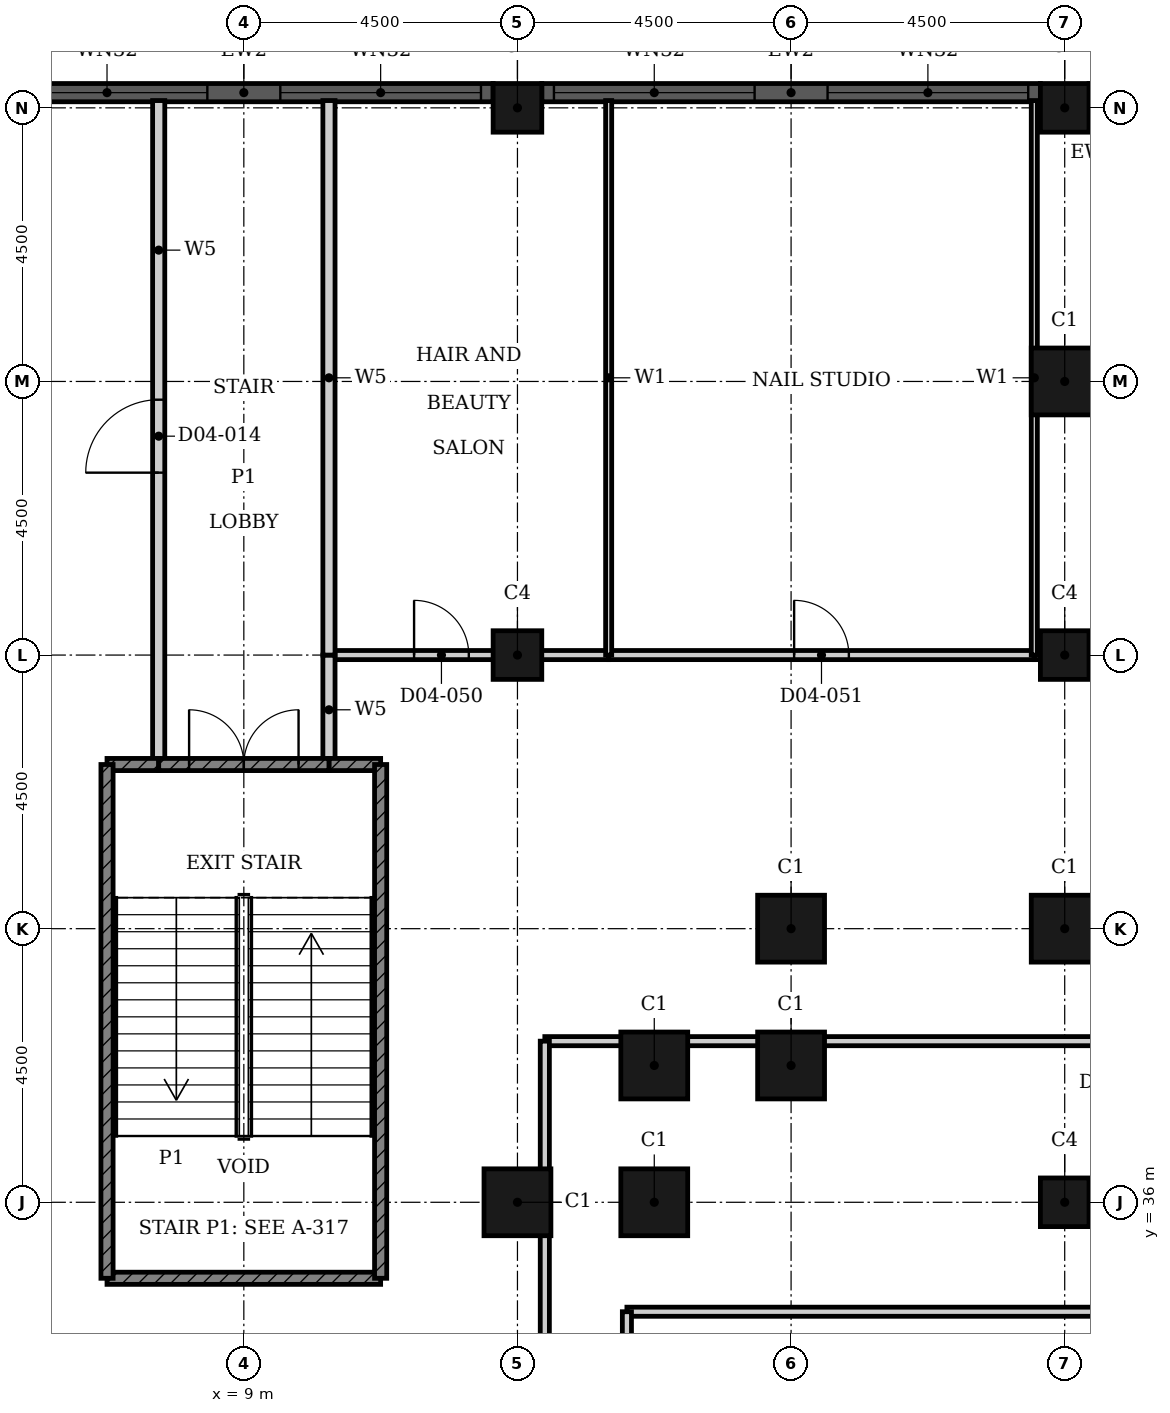
"""IFC4 building model, lengths in metres.
Left out: names, types, materials, properties, quantities, classifications, styles, units other than length and angle.
Written with IfcOpenShell. Run it as: python <this file> out.ifc"""

import sys

from ifc_helpers import new_model, si_unit, direction, frame, frame_2d, origin, origin_2d, place, context, subcontext, project, spatial, rectangle, hollow_rectangle, extrude, element, fill, save


model = new_model("IFC4")
c1 = context("Model", 3, precision=1e-05, world=origin(), true_north=direction((0.0, 1.0)))
c2 = subcontext(c1, "Body", "Model", "MODEL_VIEW")
j1 = project(units=[si_unit("LENGTHUNIT", "METRE"), si_unit("PLANEANGLEUNIT", "RADIAN")], contexts=[c1])
p1 = place(None, origin())
s1 = spatial("IfcSite", under=j1, at=p1, CompositionType="ELEMENT")
p2 = place(p1, origin())
s2 = spatial("IfcBuilding", under=s1, at=p2, CompositionType="ELEMENT")
p3 = place(p2, frame((0.0, 0.0, 24.0)))
s3 = spatial("IfcBuildingStorey", under=s2, at=p3, CompositionType="ELEMENT", Elevation=24.0)
for number, where, z_axis, x_axis in (
    (1, (22.5, 49.5, 0.0), (0.0, 0.0, 1.0), (1.0, 0.0, 0.0)),
    (2, (22.5, 40.5, 0.0), (0.0, 0.0, 1.0), (1.0, 0.0, 0.0)),
    (3, (18.0, 40.5, 0.0), (0.0, 0.0, 1.0), (1.0, 0.0, 0.0)),
    (4, (18.0, 38.25, 0.0), (0.0, 0.0, 1.0), (1.0, 0.0, 0.0)),
    (5, (15.75, 38.25, 0.0), (0.0, 0.0, 1.0), (1.0, 0.0, 0.0)),
    (6, (15.75, 36.0, 0.0), (0.0, 0.0, 1.0), (1.0, 0.0, 0.0)),
    (7, (13.5, 36.0, 0.0), (0.0, 0.0, 1.0), (1.0, 0.0, 0.0)),
):
    element("IfcColumn", number, at=place(p3, frame(where, z_axis=z_axis, x_axis=x_axis)), inside=s3, PredefinedType="COLUMN", context=c2, shape_type="SweptSolid", body=[
        extrude(hollow_rectangle(XDim=1.1, YDim=1.1, WallThickness=0.036, at=origin_2d()), origin(), (0.0, 0.0, 1.0), 4.8),
    ])
for number, where, z_axis, x_axis in (
    (8, (13.5, 54.0, 0.0), (0.0, 0.0, 1.0), (1.0, 0.0, 0.0)),
    (9, (22.5, 54.0, 0.0), (0.0, 0.0, 1.0), (1.0, 0.0, 0.0)),
    (10, (13.5, 45.0, 0.0), (0.0, 0.0, 1.0), (1.0, 0.0, 0.0)),
    (11, (22.5, 36.0, 0.0), (0.0, 0.0, 1.0), (1.0, 0.0, 0.0)),
    (12, (22.5, 45.0, 0.0), (0.0, 0.0, 1.0), (1.0, 0.0, 0.0)),
):
    element("IfcColumn", number, at=place(p3, frame(where, z_axis=z_axis, x_axis=x_axis)), inside=s3, PredefinedType="COLUMN", context=c2, shape_type="SweptSolid", body=[
        extrude(hollow_rectangle(XDim=0.8, YDim=0.8, WallThickness=0.025, at=origin_2d()), origin(), (0.0, 0.0, 1.0), 4.8),
    ])
p4 = place(p3, frame((26.45, 54.25, 0.0), z_axis=(0.0, 0.0, 1.0), x_axis=(-1.0, 0.0, 0.0)))
e13 = element("IfcWall", 13, at=p4, inside=s3, PredefinedType="SOLIDWALL", context=c2, shape_type="SweptSolid", body=[
    extrude(rectangle(XDim=3.55, YDim=0.3, at=frame_2d((1.775, 0.0))), origin(), (0.0, 0.0, 1.0), 4.8),
])
p5 = place(p4, frame((0.1, 0.0, 0.9)))
e14 = element("IfcOpeningElement", 14, at=p5, cuts=e13, PredefinedType="OPENING", context=c2, shape_type="SweptSolid", body=[
    extrude(rectangle(XDim=3.3, YDim=2.9, at=frame_2d((1.65, 1.45))), frame((0.0, 0.16, 0.0), z_axis=(0.0, -1.0, 0.0), x_axis=(1.0, 0.0, 0.0)), (0.0, 0.0, 1.0), 0.32),
])
p6 = place(p3, frame((22.1, 54.25, 0.0), z_axis=(0.0, 0.0, 1.0), x_axis=(-1.0, 0.0, 0.0)))
e15 = element("IfcWall", 15, at=p6, inside=s3, PredefinedType="SOLIDWALL", context=c2, shape_type="SweptSolid", body=[
    extrude(rectangle(XDim=8.2, YDim=0.3, at=frame_2d((4.1, 0.0))), origin(), (0.0, 0.0, 1.0), 4.8),
])
p7 = place(p6, frame((0.2, 0.0, 0.9)))
e16 = element("IfcOpeningElement", 16, at=p7, cuts=e15, PredefinedType="OPENING", context=c2, shape_type="SweptSolid", body=[
    extrude(rectangle(XDim=3.3, YDim=2.9, at=frame_2d((1.65, 1.45))), frame((0.0, 0.16, 0.0), z_axis=(0.0, -1.0, 0.0), x_axis=(1.0, 0.0, 0.0)), (0.0, 0.0, 1.0), 0.32),
])
p8 = place(p6, frame((4.7, 0.0, 0.9)))
e17 = element("IfcOpeningElement", 17, at=p8, cuts=e15, PredefinedType="OPENING", context=c2, shape_type="SweptSolid", body=[
    extrude(rectangle(XDim=3.3, YDim=2.9, at=frame_2d((1.65, 1.45))), frame((0.0, 0.16, 0.0), z_axis=(0.0, -1.0, 0.0), x_axis=(1.0, 0.0, 0.0)), (0.0, 0.0, 1.0), 0.32),
])
p9 = place(p3, frame((13.1, 54.25, 0.0), z_axis=(0.0, 0.0, 1.0), x_axis=(-1.0, 0.0, 0.0)))
e18 = element("IfcWall", 18, at=p9, inside=s3, PredefinedType="SOLIDWALL", context=c2, shape_type="SweptSolid", body=[
    extrude(rectangle(XDim=8.2, YDim=0.3, at=frame_2d((4.1, 0.0))), origin(), (0.0, 0.0, 1.0), 4.8),
])
p10 = place(p9, frame((0.2, 0.0, 0.9)))
e19 = element("IfcOpeningElement", 19, at=p10, cuts=e18, PredefinedType="OPENING", context=c2, shape_type="SweptSolid", body=[
    extrude(rectangle(XDim=3.3, YDim=2.9, at=frame_2d((1.65, 1.45))), frame((0.0, 0.16, 0.0), z_axis=(0.0, -1.0, 0.0), x_axis=(1.0, 0.0, 0.0)), (0.0, 0.0, 1.0), 0.32),
])
p11 = place(p9, frame((4.7, 0.0, 0.9)))
e20 = element("IfcOpeningElement", 20, at=p11, cuts=e18, PredefinedType="OPENING", context=c2, shape_type="SweptSolid", body=[
    extrude(rectangle(XDim=3.3, YDim=2.9, at=frame_2d((1.65, 1.45))), frame((0.0, 0.16, 0.0), z_axis=(0.0, -1.0, 0.0), x_axis=(1.0, 0.0, 0.0)), (0.0, 0.0, 1.0), 0.32),
])
p12 = place(p3, frame((15.3, 34.2, 0.0), z_axis=(0.0, 0.0, 1.0), x_axis=(1.0, 0.0, 0.0)))
e21 = element("IfcWall", 21, at=p12, inside=s3, PredefinedType="PARTITIONING", context=c2, shape_type="SweptSolid", body=[
    extrude(rectangle(XDim=17.6, YDim=0.15, at=frame_2d((8.8, 0.0))), origin(), (0.0, 0.0, 1.0), 4.45),
])
p13 = place(p3, frame((13.95, 38.65, 0.0), z_axis=(0.0, 0.0, 1.0), x_axis=(1.0, 0.0, 0.0)))
e22 = element("IfcWall", 22, at=p13, inside=s3, PredefinedType="PARTITIONING", context=c2, shape_type="SweptSolid", body=[
    extrude(rectangle(XDim=18.95, YDim=0.15, at=frame_2d((9.475, 0.0))), origin(), (0.0, 0.0, 1.0), 4.45),
])
p14 = place(p13, frame((9.025, 0.0, 0.0)))
e23 = element("IfcOpeningElement", 23, at=p14, cuts=e22, PredefinedType="OPENING", context=c2, shape_type="SweptSolid", body=[
    extrude(rectangle(XDim=0.9, YDim=2.1, at=frame_2d((0.45, 1.05))), frame((0.0, 0.085, 0.0), z_axis=(0.0, -1.0, 0.0), x_axis=(1.0, 0.0, 0.0)), (0.0, 0.0, 1.0), 0.17),
])
p15 = place(p3, frame((10.4, 45.0, 0.0), z_axis=(0.0, 0.0, 1.0), x_axis=(1.0, 0.0, 0.0)))
e24 = element("IfcWall", 24, at=p15, inside=s3, PredefinedType="PARTITIONING", context=c2, shape_type="SweptSolid", body=[
    extrude(rectangle(XDim=4.6, YDim=0.15, at=frame_2d((2.3, 0.0))), origin(), (0.0, 0.0, 1.0), 4.45),
])
p16 = place(p15, frame((1.4, 0.0, 0.0)))
e25 = element("IfcOpeningElement", 25, at=p16, cuts=e24, PredefinedType="OPENING", context=c2, shape_type="SweptSolid", body=[
    extrude(rectangle(XDim=0.9, YDim=2.1, at=frame_2d((0.45, 1.05))), frame((0.0, 0.085, 0.0), z_axis=(0.0, -1.0, 0.0), x_axis=(1.0, 0.0, 0.0)), (0.0, 0.0, 1.0), 0.17),
])
p17 = place(p3, frame((15.0, 45.0, 0.0), z_axis=(0.0, 0.0, 1.0), x_axis=(1.0, 0.0, 0.0)))
e26 = element("IfcWall", 26, at=p17, inside=s3, PredefinedType="PARTITIONING", context=c2, shape_type="SweptSolid", body=[
    extrude(rectangle(XDim=7.0, YDim=0.15, at=frame_2d((3.5, 0.0))), origin(), (0.0, 0.0, 1.0), 4.45),
])
p18 = place(p17, frame((3.05, 0.0, 0.0)))
e27 = element("IfcOpeningElement", 27, at=p18, cuts=e26, PredefinedType="OPENING", context=c2, shape_type="SweptSolid", body=[
    extrude(rectangle(XDim=0.9, YDim=2.1, at=frame_2d((0.45, 1.05))), frame((0.0, 0.085, 0.0), z_axis=(0.0, -1.0, 0.0), x_axis=(1.0, 0.0, 0.0)), (0.0, 0.0, 1.0), 0.17),
])
p19 = place(p3, frame((22.0, 45.0, 0.0), z_axis=(0.0, 0.0, 1.0), x_axis=(1.0, 0.0, 0.0)))
e28 = element("IfcWall", 28, at=p19, inside=s3, PredefinedType="PARTITIONING", context=c2, shape_type="SweptSolid", body=[
    extrude(rectangle(XDim=13.75, YDim=0.15, at=frame_2d((6.875, 0.0))), origin(), (0.0, 0.0, 1.0), 4.45),
])
p20 = place(p19, frame((6.275, 0.0, 0.0)))
e29 = element("IfcOpeningElement", 29, at=p20, cuts=e28, PredefinedType="OPENING", context=c2, shape_type="SweptSolid", body=[
    extrude(rectangle(XDim=1.2, YDim=2.4, at=frame_2d((0.6, 1.2))), frame((0.0, 0.085, 0.0), z_axis=(0.0, -1.0, 0.0), x_axis=(1.0, 0.0, 0.0)), (0.0, 0.0, 1.0), 0.17),
])
p21 = place(p3, frame((13.95, 32.05, 0.0), z_axis=(0.0, 0.0, 1.0), x_axis=(0.0, 1.0, 0.0)))
e30 = element("IfcWall", 30, at=p21, inside=s3, PredefinedType="PARTITIONING", context=c2, shape_type="SweptSolid", body=[
    extrude(rectangle(XDim=6.6, YDim=0.15, at=frame_2d((3.3, 0.0))), origin(), (0.0, 0.0, 1.0), 4.45),
])
p22 = place(p3, frame((15.3, 22.65, 0.0), z_axis=(0.0, 0.0, 1.0), x_axis=(0.0, 1.0, 0.0)))
e31 = element("IfcWall", 31, at=p22, inside=s3, PredefinedType="PARTITIONING", context=c2, shape_type="SweptSolid", body=[
    extrude(rectangle(XDim=11.55, YDim=0.15, at=frame_2d((5.775, 0.0))), origin(), (0.0, 0.0, 1.0), 4.45),
])
for number, where, z_axis, x_axis in (
    (32, (15.0, 45.0, 0.0), (0.0, 0.0, 1.0), (0.0, 1.0, 0.0)),
    (33, (22.0, 45.0, 0.0), (0.0, 0.0, 1.0), (0.0, 1.0, 0.0)),
):
    element("IfcWall", number, at=place(p3, frame(where, z_axis=z_axis, x_axis=x_axis)), inside=s3, PredefinedType="PARTITIONING", context=c2, shape_type="SweptSolid", body=[
        extrude(rectangle(XDim=9.12, YDim=0.1, at=frame_2d((4.56, 0.0))), origin(), (0.0, 0.0, 1.0), 4.45),
    ])
p23 = place(p3, frame((10.4, 43.2, 0.0), z_axis=(0.0, 0.0, 1.0), x_axis=(0.0, 1.0, 0.0)))
e34 = element("IfcWall", 34, at=p23, inside=s3, PredefinedType="PARTITIONING", context=c2, shape_type="SweptSolid", body=[
    extrude(rectangle(XDim=1.8, YDim=0.2, at=frame_2d((0.9, 0.0))), origin(), (0.0, 0.0, 1.0), 4.45),
])
p24 = place(p3, frame((10.4, 45.0, 0.0), z_axis=(0.0, 0.0, 1.0), x_axis=(0.0, 1.0, 0.0)))
e35 = element("IfcWall", 35, at=p24, inside=s3, PredefinedType="PARTITIONING", context=c2, shape_type="SweptSolid", body=[
    extrude(rectangle(XDim=9.12, YDim=0.2, at=frame_2d((4.56, 0.0))), origin(), (0.0, 0.0, 1.0), 4.45),
])
p25 = place(p3, frame((7.6, 43.2, 0.0), z_axis=(0.0, 0.0, 1.0), x_axis=(0.0, 1.0, 0.0)))
e36 = element("IfcWall", 36, at=p25, inside=s3, PredefinedType="PARTITIONING", context=c2, shape_type="SweptSolid", body=[
    extrude(rectangle(XDim=10.92, YDim=0.2, at=frame_2d((5.46, 0.0))), origin(), (0.0, 0.0, 1.0), 4.45),
])
p26 = place(p25, frame((4.8, 0.0, 0.0)))
e37 = element("IfcOpeningElement", 37, at=p26, cuts=e36, PredefinedType="OPENING", context=c2, shape_type="SweptSolid", body=[
    extrude(rectangle(XDim=1.2, YDim=2.1, at=frame_2d((0.6, 1.05))), frame((0.0, 0.11, 0.0), z_axis=(0.0, -1.0, 0.0), x_axis=(1.0, 0.0, 0.0)), (0.0, 0.0, 1.0), 0.22),
])
p27 = place(p3, frame((6.75, 34.75, 0.0), z_axis=(0.0, 0.0, 1.0), x_axis=(1.0, 0.0, 0.0)))
e38 = element("IfcWall", 38, at=p27, inside=s3, PredefinedType="SHEAR", context=c2, shape_type="SweptSolid", body=[
    extrude(rectangle(XDim=4.5, YDim=0.2, at=frame_2d((2.25, 0.0))), origin(), (0.0, 0.0, 1.0), 4.45),
])
for number, where, z_axis, x_axis in (
    (39, (6.75, 43.2, 0.0), (0.0, 0.0, 1.0), (1.0, 0.0, 0.0)),
    (40, (10.4, 43.2, 0.0), (0.0, 0.0, 1.0), (1.0, 0.0, 0.0)),
):
    element("IfcWall", number, at=place(p3, frame(where, z_axis=z_axis, x_axis=x_axis)), inside=s3, PredefinedType="SHEAR", context=c2, shape_type="SweptSolid", body=[
        extrude(rectangle(XDim=0.85, YDim=0.2, at=frame_2d((0.425, 0.0))), origin(), (0.0, 0.0, 1.0), 4.45),
    ])
p28 = place(p3, frame((7.6, 43.2, 0.0), z_axis=(0.0, 0.0, 1.0), x_axis=(1.0, 0.0, 0.0)))
e41 = element("IfcWall", 41, at=p28, inside=s3, PredefinedType="SHEAR", context=c2, shape_type="SweptSolid", body=[
    extrude(rectangle(XDim=2.8, YDim=0.2, at=frame_2d((1.4, 0.0))), origin(), (0.0, 0.0, 1.0), 4.45),
])
p29 = place(p28, frame((0.5, 0.0, 0.0)))
e42 = element("IfcOpeningElement", 42, at=p29, cuts=e41, PredefinedType="OPENING", context=c2, shape_type="SweptSolid", body=[
    extrude(rectangle(XDim=1.8, YDim=2.1, at=frame_2d((0.9, 1.05))), frame((0.0, 0.11, 0.0), z_axis=(0.0, -1.0, 0.0), x_axis=(1.0, 0.0, 0.0)), (0.0, 0.0, 1.0), 0.22),
])
for number, where, z_axis, x_axis in (
    (43, (11.25, 34.75, 0.0), (0.0, 0.0, 1.0), (0.0, 1.0, 0.0)),
    (44, (6.75, 34.75, 0.0), (0.0, 0.0, 1.0), (0.0, 1.0, 0.0)),
):
    element("IfcWall", number, at=place(p3, frame(where, z_axis=z_axis, x_axis=x_axis)), inside=s3, PredefinedType="SHEAR", context=c2, shape_type="SweptSolid", body=[
        extrude(rectangle(XDim=8.45, YDim=0.2, at=frame_2d((4.225, 0.0))), origin(), (0.0, 0.0, 1.0), 4.45),
    ])
p30 = place(p7, origin())
e45 = element("IfcWindow", 45, at=p30, inside=s3, PartitioningType="SINGLE_PANEL", PredefinedType="WINDOW", context=c2, shape_type="SweptSolid", body=[
    extrude(rectangle(XDim=3.3, YDim=2.9, at=frame_2d((1.65, 1.45))), frame((0.0, 0.03, 0.0), z_axis=(0.0, -1.0, 0.0), x_axis=(1.0, 0.0, 0.0)), (0.0, 0.0, 1.0), 0.06),
])
fill(e16, e45)
p31 = place(p8, origin())
e46 = element("IfcWindow", 46, at=p31, inside=s3, PartitioningType="SINGLE_PANEL", PredefinedType="WINDOW", context=c2, shape_type="SweptSolid", body=[
    extrude(rectangle(XDim=3.3, YDim=2.9, at=frame_2d((1.65, 1.45))), frame((0.0, 0.03, 0.0), z_axis=(0.0, -1.0, 0.0), x_axis=(1.0, 0.0, 0.0)), (0.0, 0.0, 1.0), 0.06),
])
fill(e17, e46)
p32 = place(p10, origin())
e47 = element("IfcWindow", 47, at=p32, inside=s3, PartitioningType="SINGLE_PANEL", PredefinedType="WINDOW", context=c2, shape_type="SweptSolid", body=[
    extrude(rectangle(XDim=3.3, YDim=2.9, at=frame_2d((1.65, 1.45))), frame((0.0, 0.03, 0.0), z_axis=(0.0, -1.0, 0.0), x_axis=(1.0, 0.0, 0.0)), (0.0, 0.0, 1.0), 0.06),
])
fill(e19, e47)
p33 = place(p11, origin())
e48 = element("IfcWindow", 48, at=p33, inside=s3, PartitioningType="SINGLE_PANEL", PredefinedType="WINDOW", context=c2, shape_type="SweptSolid", body=[
    extrude(rectangle(XDim=3.3, YDim=2.9, at=frame_2d((1.65, 1.45))), frame((0.0, 0.03, 0.0), z_axis=(0.0, -1.0, 0.0), x_axis=(1.0, 0.0, 0.0)), (0.0, 0.0, 1.0), 0.06),
])
fill(e20, e48)
p34 = place(p26, origin())
e49 = element("IfcDoor", 49, at=p34, inside=s3, OperationType="SINGLE_SWING_RIGHT", PredefinedType="DOOR", context=c2, shape_type="SweptSolid", body=[
    extrude(rectangle(XDim=1.2, YDim=2.1, at=frame_2d((0.6, 1.05))), frame((0.0, 0.025, 0.0), z_axis=(0.0, -1.0, 0.0), x_axis=(1.0, 0.0, 0.0)), (0.0, 0.0, 1.0), 0.05),
])
fill(e37, e49)
p35 = place(p29, origin())
e50 = element("IfcDoor", 50, at=p35, inside=s3, OperationType="DOUBLE_DOOR_SINGLE_SWING", PredefinedType="DOOR", context=c2, shape_type="SweptSolid", body=[
    extrude(rectangle(XDim=1.8, YDim=2.1, at=frame_2d((0.9, 1.05))), frame((0.0, 0.025, 0.0), z_axis=(0.0, -1.0, 0.0), x_axis=(1.0, 0.0, 0.0)), (0.0, 0.0, 1.0), 0.05),
])
fill(e42, e50)
p36 = place(p16, origin())
e51 = element("IfcDoor", 51, at=p36, inside=s3, OperationType="SINGLE_SWING_LEFT", PredefinedType="DOOR", context=c2, shape_type="SweptSolid", body=[
    extrude(rectangle(XDim=0.9, YDim=2.1, at=frame_2d((0.45, 1.05))), frame((0.0, 0.025, 0.0), z_axis=(0.0, -1.0, 0.0), x_axis=(1.0, 0.0, 0.0)), (0.0, 0.0, 1.0), 0.05),
])
fill(e25, e51)
p37 = place(p18, origin())
e52 = element("IfcDoor", 52, at=p37, inside=s3, OperationType="SINGLE_SWING_RIGHT", PredefinedType="DOOR", context=c2, shape_type="SweptSolid", body=[
    extrude(rectangle(XDim=0.9, YDim=2.1, at=frame_2d((0.45, 1.05))), frame((0.0, 0.025, 0.0), z_axis=(0.0, -1.0, 0.0), x_axis=(1.0, 0.0, 0.0)), (0.0, 0.0, 1.0), 0.05),
])
fill(e27, e52)
save(model, sys.argv[1])
